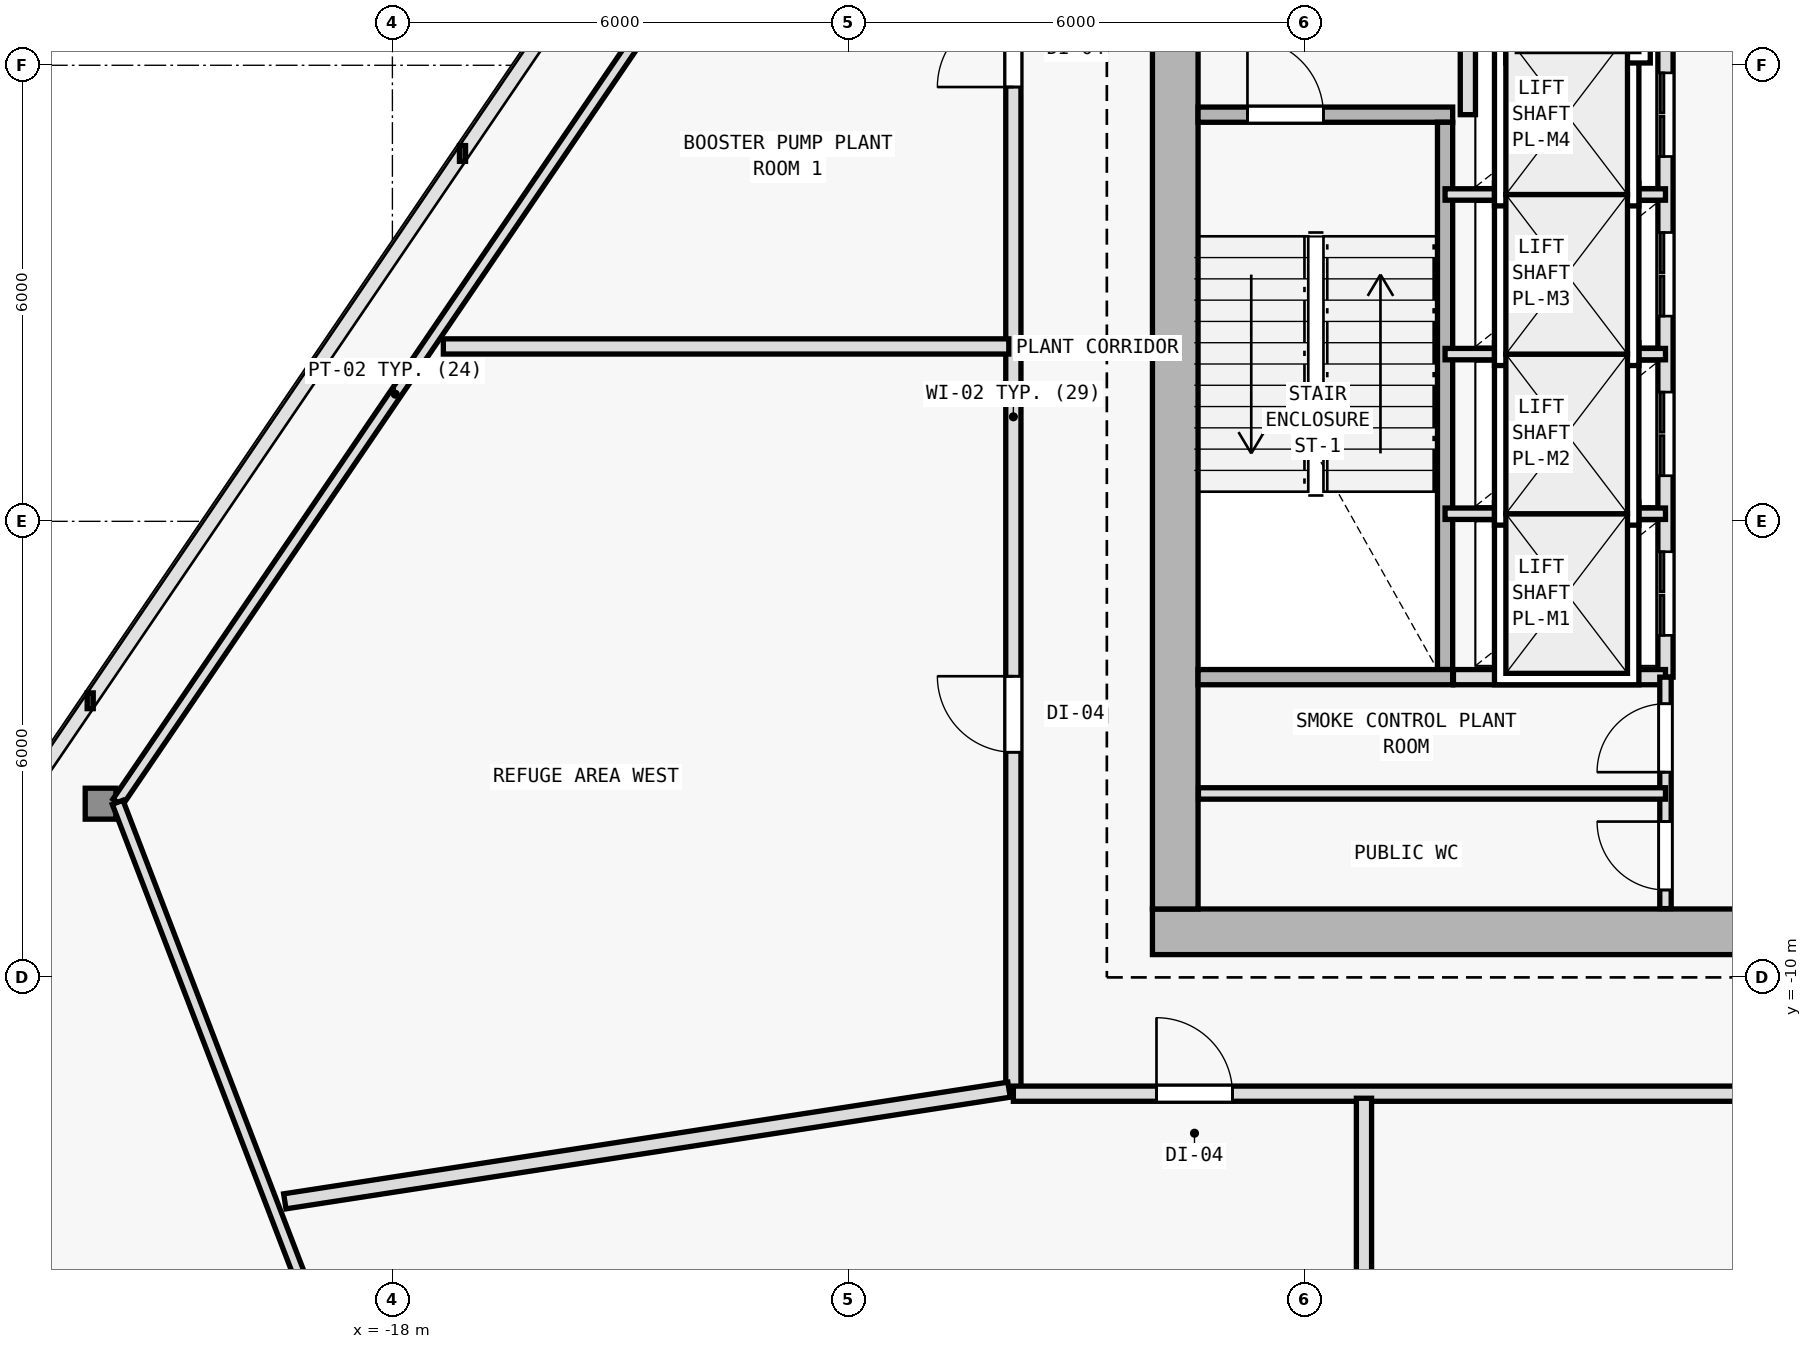
"""IFC4 building model, lengths in metres.
Left out: names, types, materials, properties, quantities, classifications, styles, units other than length and angle.
Written with IfcOpenShell. Run it as: python <this file> out.ifc"""

import sys

from ifc_helpers import new_model, si_unit, direction, frame, frame_2d, origin, origin_2d, place, context, subcontext, project, spatial, rectangle, i_section, extrude, element, fill, save


model = new_model("IFC4")
c1 = context("Model", 3, precision=1e-05, world=origin(), true_north=direction((0.0, 1.0)))
c2 = subcontext(c1, "Body", "Model", "MODEL_VIEW")
j1 = project(units=[si_unit("LENGTHUNIT", "METRE"), si_unit("PLANEANGLEUNIT", "RADIAN")], contexts=[c1])
p1 = place(None, origin())
s1 = spatial("IfcSite", under=j1, at=p1, CompositionType="ELEMENT")
p2 = place(p1, origin())
s2 = spatial("IfcBuilding", under=s1, at=p2, CompositionType="ELEMENT")
p3 = place(p2, frame((0.0, 0.0, 129.3)))
s3 = spatial("IfcBuildingStorey", under=s2, at=p3, CompositionType="ELEMENT", Elevation=129.3)
for number, where, z_axis, x_axis in (
    (1, (-7.7, -9.4, 0.0), (0.0, 0.0, 1.0), (1.0, 0.0, 0.0)),
    (2, (-7.7, 2.0, 0.0), (0.0, 0.0, 1.0), (1.0, 0.0, 0.0)),
):
    element("IfcColumn", number, at=place(p3, frame(where, z_axis=z_axis, x_axis=x_axis)), inside=s3, PredefinedType="COLUMN", context=c2, shape_type="SweptSolid", body=[
        extrude(i_section(OverallWidth=0.409, OverallDepth=0.425, WebThickness=0.021, FlangeThickness=0.034, FilletRadius=0.015, at=origin_2d()), origin(), (0.0, 0.0, 1.0), 4.8),
    ])
p4 = place(p3, frame((-21.84, -7.715, 0.005), z_axis=(0.018907266959, 0.016206228822, 0.999689888617), x_axis=(-0.650791373456, 0.759256602365, 0.0)))
e3 = element("IfcColumn", 3, at=p4, inside=s3, PredefinedType="COLUMN", context=c2, shape_type="SweptSolid", body=[
    extrude(i_section(OverallWidth=0.404, OverallDepth=0.407, WebThickness=0.017, FlangeThickness=0.028, FilletRadius=0.015, at=origin_2d()), origin(), (0.0, 0.0, 1.0), 4.791),
])
p5 = place(p3, frame((-8.0, -9.4, 0.0), z_axis=(0.0, 0.0, 1.0), x_axis=(1.0, 0.0, 0.0)))
e4 = element("IfcWall", 4, at=p5, inside=s3, PredefinedType="SHEAR", context=c2, shape_type="SweptSolid", body=[
    extrude(rectangle(XDim=16.0, YDim=0.6, at=frame_2d((8.0, 0.0))), origin(), (0.0, 0.0, 1.0), 4.5),
])
p6 = place(p5, frame((9.65, 0.0, 0.0)))
e5 = element("IfcOpeningElement", 5, at=p6, cuts=e4, PredefinedType="OPENING", context=c2, shape_type="SweptSolid", body=[
    extrude(rectangle(XDim=1.5, YDim=2.2, at=frame_2d((0.75, 1.1))), frame((0.0, 0.31, 0.0), z_axis=(0.0, -1.0, 0.0), x_axis=(1.0, 0.0, 0.0)), (0.0, 0.0, 1.0), 0.62),
])
p7 = place(p3, frame((-7.7, -9.1, 0.0), z_axis=(0.0, 0.0, 1.0), x_axis=(0.0, 1.0, 0.0)))
e6 = element("IfcWall", 6, at=p7, inside=s3, PredefinedType="SHEAR", context=c2, shape_type="SweptSolid", body=[
    extrude(rectangle(XDim=19.0, YDim=0.6, at=frame_2d((9.5, 0.0))), origin(), (0.0, 0.0, 1.0), 4.5),
])
p8 = place(p7, frame((12.65, 0.0, 0.0)))
e7 = element("IfcOpeningElement", 7, at=p8, cuts=e6, PredefinedType="OPENING", context=c2, shape_type="SweptSolid", body=[
    extrude(rectangle(XDim=1.1, YDim=2.15, at=frame_2d((0.55, 1.075))), frame((0.0, 0.31, 0.0), z_axis=(0.0, -1.0, 0.0), x_axis=(1.0, 0.0, 0.0)), (0.0, 0.0, 1.0), 0.62),
])
p9 = place(p3, frame((-7.4, 1.35, 0.0), z_axis=(0.0, 0.0, 1.0), x_axis=(1.0, 0.0, 0.0)))
e8 = element("IfcWall", 8, at=p9, inside=s3, PredefinedType="SOLIDWALL", context=c2, shape_type="SweptSolid", body=[
    extrude(rectangle(XDim=3.35, YDim=0.2, at=frame_2d((1.675, 0.0))), origin(), (0.0, 0.0, 1.0), 4.5),
])
p10 = place(p9, frame((0.65, 0.0, 0.0)))
e9 = element("IfcOpeningElement", 9, at=p10, cuts=e8, PredefinedType="OPENING", context=c2, shape_type="SweptSolid", body=[
    extrude(rectangle(XDim=1.0, YDim=2.15, at=frame_2d((0.5, 1.075))), frame((0.0, 0.11, 0.0), z_axis=(0.0, -1.0, 0.0), x_axis=(1.0, 0.0, 0.0)), (0.0, 0.0, 1.0), 0.22),
])
p11 = place(p3, frame((-4.15, -5.95, 0.0), z_axis=(0.0, 0.0, 1.0), x_axis=(0.0, 1.0, 0.0)))
e10 = element("IfcWall", 10, at=p11, inside=s3, PredefinedType="SOLIDWALL", context=c2, shape_type="SweptSolid", body=[
    extrude(rectangle(XDim=7.2, YDim=0.2, at=frame_2d((3.6, 0.0))), origin(), (0.0, 0.0, 1.0), 4.5),
])
p12 = place(p3, frame((-3.85, 1.35, 0.0), z_axis=(0.0, 0.0, 1.0), x_axis=(0.0, 1.0, 0.0)))
e11 = element("IfcWall", 11, at=p12, inside=s3, PredefinedType="SOLIDWALL", context=c2, shape_type="SweptSolid", body=[
    extrude(rectangle(XDim=8.545, YDim=0.2, at=frame_2d((4.272, 0.0))), origin(), (0.0, 0.0, 1.0), 4.5),
])
p13 = place(p12, frame((1.5, 0.0, 0.0)))
e12 = element("IfcOpeningElement", 12, at=p13, cuts=e11, PredefinedType="OPENING", context=c2, shape_type="SweptSolid", body=[
    extrude(rectangle(XDim=1.0, YDim=2.15, at=frame_2d((0.5, 1.075))), frame((0.0, 0.11, 0.0), z_axis=(0.0, -1.0, 0.0), x_axis=(1.0, 0.0, 0.0)), (0.0, 0.0, 1.0), 0.22),
])
p14 = place(p12, frame((3.18, 0.0, 0.0)))
e13 = element("IfcOpeningElement", 13, at=p14, cuts=e11, PredefinedType="OPENING", context=c2, shape_type="SweptSolid", body=[
    extrude(rectangle(XDim=1.0, YDim=2.15, at=frame_2d((0.5, 1.075))), frame((0.0, 0.11, 0.0), z_axis=(0.0, -1.0, 0.0), x_axis=(1.0, 0.0, 0.0)), (0.0, 0.0, 1.0), 0.22),
])
p15 = place(p3, frame((-1.25, -6.05, 0.0), z_axis=(0.0, 0.0, 1.0), x_axis=(0.0, 1.0, 0.0)))
e14 = element("IfcWall", 14, at=p15, inside=s3, PredefinedType="SOLIDWALL", context=c2, shape_type="SweptSolid", body=[
    extrude(rectangle(XDim=8.7, YDim=0.2, at=frame_2d((4.35, 0.0))), origin(), (0.0, 0.0, 1.0), 4.5),
])
p16 = place(p15, frame((0.55, 0.0, 0.0)))
e15 = element("IfcOpeningElement", 15, at=p16, cuts=e14, PredefinedType="OPENING", context=c2, shape_type="SweptSolid", body=[
    extrude(rectangle(XDim=1.1, YDim=2.15, at=frame_2d((0.55, 1.075))), frame((0.0, 0.11, 0.0), z_axis=(0.0, -1.0, 0.0), x_axis=(1.0, 0.0, 0.0)), (0.0, 0.0, 1.0), 0.22),
])
p17 = place(p15, frame((2.65, 0.0, 0.0)))
e16 = element("IfcOpeningElement", 16, at=p17, cuts=e14, PredefinedType="OPENING", context=c2, shape_type="SweptSolid", body=[
    extrude(rectangle(XDim=1.1, YDim=2.15, at=frame_2d((0.55, 1.075))), frame((0.0, 0.11, 0.0), z_axis=(0.0, -1.0, 0.0), x_axis=(1.0, 0.0, 0.0)), (0.0, 0.0, 1.0), 0.22),
])
p18 = place(p15, frame((4.75, 0.0, 0.0)))
e17 = element("IfcOpeningElement", 17, at=p18, cuts=e14, PredefinedType="OPENING", context=c2, shape_type="SweptSolid", body=[
    extrude(rectangle(XDim=1.1, YDim=2.15, at=frame_2d((0.55, 1.075))), frame((0.0, 0.11, 0.0), z_axis=(0.0, -1.0, 0.0), x_axis=(1.0, 0.0, 0.0)), (0.0, 0.0, 1.0), 0.22),
])
p19 = place(p15, frame((6.85, 0.0, 0.0)))
e18 = element("IfcOpeningElement", 18, at=p19, cuts=e14, PredefinedType="OPENING", context=c2, shape_type="SweptSolid", body=[
    extrude(rectangle(XDim=1.1, YDim=2.15, at=frame_2d((0.55, 1.075))), frame((0.0, 0.11, 0.0), z_axis=(0.0, -1.0, 0.0), x_axis=(1.0, 0.0, 0.0)), (0.0, 0.0, 1.0), 0.22),
])
for number, where, z_axis, x_axis in (
    (19, (-4.15, -3.9, 0.0), (0.0, 0.0, 1.0), (1.0, 0.0, 0.0)),
    (20, (-4.15, -1.8, 0.0), (0.0, 0.0, 1.0), (1.0, 0.0, 0.0)),
    (21, (-4.15, 0.3, 0.0), (0.0, 0.0, 1.0), (1.0, 0.0, 0.0)),
):
    element("IfcWall", number, at=place(p3, frame(where, z_axis=z_axis, x_axis=x_axis)), inside=s3, PredefinedType="PARTITIONING", context=c2, shape_type="SweptSolid", body=[
        extrude(rectangle(XDim=2.9, YDim=0.15, at=frame_2d((1.45, 0.0))), origin(), (0.0, 0.0, 1.0), 4.5),
    ])
p20 = place(p3, frame((-7.4, -6.05, 0.0), z_axis=(0.0, 0.0, 1.0), x_axis=(1.0, 0.0, 0.0)))
e22 = element("IfcWall", 22, at=p20, inside=s3, PredefinedType="SOLIDWALL", context=c2, shape_type="SweptSolid", body=[
    extrude(rectangle(XDim=3.35, YDim=0.2, at=frame_2d((1.675, 0.0))), origin(), (0.0, 0.0, 1.0), 4.5),
])
p21 = place(p3, frame((-4.04, -6.05, 0.0), z_axis=(0.0, 0.0, 1.0), x_axis=(1.0, 0.0, 0.0)))
e23 = element("IfcWall", 23, at=p21, inside=s3, PredefinedType="SOLIDWALL", context=c2, shape_type="SweptSolid", body=[
    extrude(rectangle(XDim=2.79, YDim=0.2, at=frame_2d((1.395, 0.0))), origin(), (0.0, 0.0, 1.0), 4.5),
])
p22 = place(p3, frame((-1.25, -9.095, 0.0), z_axis=(0.0, 0.0, 1.0), x_axis=(0.0, 1.0, 0.0)))
e24 = element("IfcWall", 24, at=p22, inside=s3, PredefinedType="PARTITIONING", context=c2, shape_type="SweptSolid", body=[
    extrude(rectangle(XDim=3.045, YDim=0.15, at=frame_2d((1.522, 0.0))), origin(), (0.0, 0.0, 1.0), 4.5),
])
p23 = place(p22, frame((1.795, 0.0, 0.0)))
e25 = element("IfcOpeningElement", 25, at=p23, cuts=e24, PredefinedType="OPENING", context=c2, shape_type="SweptSolid", body=[
    extrude(rectangle(XDim=0.9, YDim=2.1, at=frame_2d((0.45, 1.05))), frame((0.0, 0.085, 0.0), z_axis=(0.0, -1.0, 0.0), x_axis=(1.0, 0.0, 0.0)), (0.0, 0.0, 1.0), 0.17),
])
p24 = place(p22, frame((0.245, 0.0, 0.0)))
e26 = element("IfcOpeningElement", 26, at=p24, cuts=e24, PredefinedType="OPENING", context=c2, shape_type="SweptSolid", body=[
    extrude(rectangle(XDim=0.9, YDim=2.1, at=frame_2d((0.45, 1.05))), frame((0.0, 0.085, 0.0), z_axis=(0.0, -1.0, 0.0), x_axis=(1.0, 0.0, 0.0)), (0.0, 0.0, 1.0), 0.17),
])
p25 = place(p3, frame((-7.395, -7.58, 0.0), z_axis=(0.0, 0.0, 1.0), x_axis=(1.0, 0.0, 0.0)))
e27 = element("IfcWall", 27, at=p25, inside=s3, PredefinedType="PARTITIONING", context=c2, shape_type="SweptSolid", body=[
    extrude(rectangle(XDim=6.145, YDim=0.15, at=frame_2d((3.073, 0.0))), origin(), (0.0, 0.0, 1.0), 4.5),
])
p26 = place(p3, frame((-21.615, -7.697, 0.0), z_axis=(0.0, 0.0, 1.0), x_axis=(0.562462197544, 0.826823001817, 0.0)))
e28 = element("IfcWall", 28, at=p26, inside=s3, PredefinedType="PARTITIONING", context=c2, shape_type="SweptSolid", body=[
    extrude(rectangle(XDim=12.988, YDim=0.15, at=frame_2d((6.494, 0.0))), origin(), (0.0, 0.0, 1.0), 3.925),
])
p27 = place(p3, frame((-18.153, -16.706, 0.0), z_axis=(0.0, 0.0, 1.0), x_axis=(-0.358704472601, 0.9334511778, 0.0)))
e29 = element("IfcWall", 29, at=p27, inside=s3, PredefinedType="PARTITIONING", context=c2, shape_type="SweptSolid", body=[
    extrude(rectangle(XDim=9.652, YDim=0.15, at=frame_2d((4.826, 0.0))), origin(), (0.0, 0.0, 1.0), 3.925),
])
p28 = place(p3, frame((-9.83, -11.53, 0.0), z_axis=(0.0, 0.0, 1.0), x_axis=(0.0, 1.0, 0.0)))
e30 = element("IfcWall", 30, at=p28, inside=s3, PredefinedType="SOLIDWALL", context=c2, shape_type="SweptSolid", body=[
    extrude(rectangle(XDim=17.81, YDim=0.2, at=frame_2d((8.905, 0.0))), origin(), (0.0, 0.0, 1.0), 3.875),
])
p29 = place(p28, frame((4.492, 0.0, 0.0)))
e31 = element("IfcOpeningElement", 31, at=p29, cuts=e30, PredefinedType="OPENING", context=c2, shape_type="SweptSolid", body=[
    extrude(rectangle(XDim=1.0, YDim=2.15, at=frame_2d((0.5, 1.075))), frame((0.0, 0.11, 0.0), z_axis=(0.0, -1.0, 0.0), x_axis=(1.0, 0.0, 0.0)), (0.0, 0.0, 1.0), 0.22),
])
p30 = place(p28, frame((13.244, 0.0, 0.0)))
e32 = element("IfcOpeningElement", 32, at=p30, cuts=e30, PredefinedType="OPENING", context=c2, shape_type="SweptSolid", body=[
    extrude(rectangle(XDim=1.0, YDim=2.15, at=frame_2d((0.5, 1.075))), frame((0.0, 0.11, 0.0), z_axis=(0.0, -1.0, 0.0), x_axis=(1.0, 0.0, 0.0)), (0.0, 0.0, 1.0), 0.22),
])
p31 = place(p3, frame((-9.83, -11.53, 0.0), z_axis=(0.0, 0.0, 1.0), x_axis=(1.0, 0.0, 0.0)))
e33 = element("IfcWall", 33, at=p31, inside=s3, PredefinedType="SOLIDWALL", context=c2, shape_type="SweptSolid", body=[
    extrude(rectangle(XDim=19.66, YDim=0.2, at=frame_2d((9.83, 0.0))), origin(), (0.0, 0.0, 1.0), 3.875),
])
p32 = place(p31, frame((1.883, 0.0, 0.0)))
e34 = element("IfcOpeningElement", 34, at=p32, cuts=e33, PredefinedType="OPENING", context=c2, shape_type="SweptSolid", body=[
    extrude(rectangle(XDim=1.0, YDim=2.15, at=frame_2d((0.5, 1.075))), frame((0.0, 0.11, 0.0), z_axis=(0.0, -1.0, 0.0), x_axis=(1.0, 0.0, 0.0)), (0.0, 0.0, 1.0), 0.22),
])
p33 = place(p31, frame((11.397, 0.0, 0.0)))
e35 = element("IfcOpeningElement", 35, at=p33, cuts=e33, PredefinedType="OPENING", context=c2, shape_type="SweptSolid", body=[
    extrude(rectangle(XDim=1.0, YDim=2.15, at=frame_2d((0.5, 1.075))), frame((0.0, 0.11, 0.0), z_axis=(0.0, -1.0, 0.0), x_axis=(1.0, 0.0, 0.0)), (0.0, 0.0, 1.0), 0.22),
])
p34 = place(p3, frame((-9.89, -1.699, 0.0), z_axis=(0.0, 0.0, 1.0), x_axis=(-1.0, 0.0, 0.0)))
e36 = element("IfcWall", 36, at=p34, inside=s3, PredefinedType="SOLIDWALL", context=c2, shape_type="SweptSolid", body=[
    extrude(rectangle(XDim=7.44, YDim=0.2, at=frame_2d((3.72, 0.0))), origin(), (0.0, 0.0, 1.0), 3.875),
])
p35 = place(p3, frame((-9.887, -11.477, 0.0), z_axis=(0.0, 0.0, 1.0), x_axis=(-0.988323930856, -0.152367344589, 0.0)))
e37 = element("IfcWall", 37, at=p35, inside=s3, PredefinedType="SOLIDWALL", context=c2, shape_type="SweptSolid", body=[
    extrude(rectangle(XDim=9.641, YDim=0.2, at=frame_2d((4.821, 0.0))), origin(), (0.0, 0.0, 1.0), 3.875),
])
p36 = place(p3, frame((-5.217, -11.59, 0.0), z_axis=(0.0, 0.0, 1.0), x_axis=(0.0, -1.0, 0.0)))
e38 = element("IfcWall", 38, at=p36, inside=s3, PredefinedType="SOLIDWALL", context=c2, shape_type="SweptSolid", body=[
    extrude(rectangle(XDim=6.492, YDim=0.2, at=frame_2d((3.246, 0.0))), origin(), (0.0, 0.0, 1.0), 3.875),
])
p37 = place(p10, origin())
e39 = element("IfcDoor", 39, at=p37, inside=s3, OperationType="SINGLE_SWING_LEFT", PredefinedType="DOOR", context=c2, shape_type="SweptSolid", body=[
    extrude(rectangle(XDim=1.0, YDim=2.15, at=frame_2d((0.5, 1.075))), frame((0.0, 0.025, 0.0), z_axis=(0.0, -1.0, 0.0), x_axis=(1.0, 0.0, 0.0)), (0.0, 0.0, 1.0), 0.05),
])
fill(e9, e39)
p38 = place(p16, origin())
e40 = element("IfcDoor", 40, at=p38, inside=s3, OperationType="DOUBLE_DOOR_SLIDING", PredefinedType="DOOR", context=c2, shape_type="SweptSolid", body=[
    extrude(rectangle(XDim=1.1, YDim=2.15, at=frame_2d((0.55, 1.075))), frame((0.0, 0.025, 0.0), z_axis=(0.0, -1.0, 0.0), x_axis=(1.0, 0.0, 0.0)), (0.0, 0.0, 1.0), 0.05),
])
fill(e15, e40)
p39 = place(p17, origin())
e41 = element("IfcDoor", 41, at=p39, inside=s3, OperationType="DOUBLE_DOOR_SLIDING", PredefinedType="DOOR", context=c2, shape_type="SweptSolid", body=[
    extrude(rectangle(XDim=1.1, YDim=2.15, at=frame_2d((0.55, 1.075))), frame((0.0, 0.025, 0.0), z_axis=(0.0, -1.0, 0.0), x_axis=(1.0, 0.0, 0.0)), (0.0, 0.0, 1.0), 0.05),
])
fill(e16, e41)
p40 = place(p18, origin())
e42 = element("IfcDoor", 42, at=p40, inside=s3, OperationType="DOUBLE_DOOR_SLIDING", PredefinedType="DOOR", context=c2, shape_type="SweptSolid", body=[
    extrude(rectangle(XDim=1.1, YDim=2.15, at=frame_2d((0.55, 1.075))), frame((0.0, 0.025, 0.0), z_axis=(0.0, -1.0, 0.0), x_axis=(1.0, 0.0, 0.0)), (0.0, 0.0, 1.0), 0.05),
])
fill(e17, e42)
p41 = place(p19, origin())
e43 = element("IfcDoor", 43, at=p41, inside=s3, OperationType="DOUBLE_DOOR_SLIDING", PredefinedType="DOOR", context=c2, shape_type="SweptSolid", body=[
    extrude(rectangle(XDim=1.1, YDim=2.15, at=frame_2d((0.55, 1.075))), frame((0.0, 0.025, 0.0), z_axis=(0.0, -1.0, 0.0), x_axis=(1.0, 0.0, 0.0)), (0.0, 0.0, 1.0), 0.05),
])
fill(e18, e43)
p42 = place(p23, origin())
e44 = element("IfcDoor", 44, at=p42, inside=s3, OperationType="SINGLE_SWING_LEFT", PredefinedType="DOOR", context=c2, shape_type="SweptSolid", body=[
    extrude(rectangle(XDim=0.9, YDim=2.1, at=frame_2d((0.45, 1.05))), frame((0.0, 0.025, 0.0), z_axis=(0.0, -1.0, 0.0), x_axis=(1.0, 0.0, 0.0)), (0.0, 0.0, 1.0), 0.05),
])
fill(e25, e44)
p43 = place(p24, origin())
e45 = element("IfcDoor", 45, at=p43, inside=s3, OperationType="SINGLE_SWING_RIGHT", PredefinedType="DOOR", context=c2, shape_type="SweptSolid", body=[
    extrude(rectangle(XDim=0.9, YDim=2.1, at=frame_2d((0.45, 1.05))), frame((0.0, 0.025, 0.0), z_axis=(0.0, -1.0, 0.0), x_axis=(1.0, 0.0, 0.0)), (0.0, 0.0, 1.0), 0.05),
])
fill(e26, e45)
p44 = place(p29, origin())
e46 = element("IfcDoor", 46, at=p44, inside=s3, OperationType="SINGLE_SWING_RIGHT", PredefinedType="DOOR", context=c2, shape_type="SweptSolid", body=[
    extrude(rectangle(XDim=1.0, YDim=2.15, at=frame_2d((0.5, 1.075))), frame((0.0, 0.025, 0.0), z_axis=(0.0, -1.0, 0.0), x_axis=(1.0, 0.0, 0.0)), (0.0, 0.0, 1.0), 0.05),
])
fill(e31, e46)
p45 = place(p32, origin())
e47 = element("IfcDoor", 47, at=p45, inside=s3, OperationType="SINGLE_SWING_LEFT", PredefinedType="DOOR", context=c2, shape_type="SweptSolid", body=[
    extrude(rectangle(XDim=1.0, YDim=2.15, at=frame_2d((0.5, 1.075))), frame((0.0, 0.025, 0.0), z_axis=(0.0, -1.0, 0.0), x_axis=(1.0, 0.0, 0.0)), (0.0, 0.0, 1.0), 0.05),
])
fill(e34, e47)
p46 = place(p30, origin())
e48 = element("IfcDoor", 48, at=p46, inside=s3, OperationType="SINGLE_SWING_LEFT", PredefinedType="DOOR", context=c2, shape_type="SweptSolid", body=[
    extrude(rectangle(XDim=1.0, YDim=2.15, at=frame_2d((0.5, 1.075))), frame((0.0, 0.025, 0.0), z_axis=(0.0, -1.0, 0.0), x_axis=(1.0, 0.0, 0.0)), (0.0, 0.0, 1.0), 0.05),
])
fill(e32, e48)
save(model, sys.argv[1])
